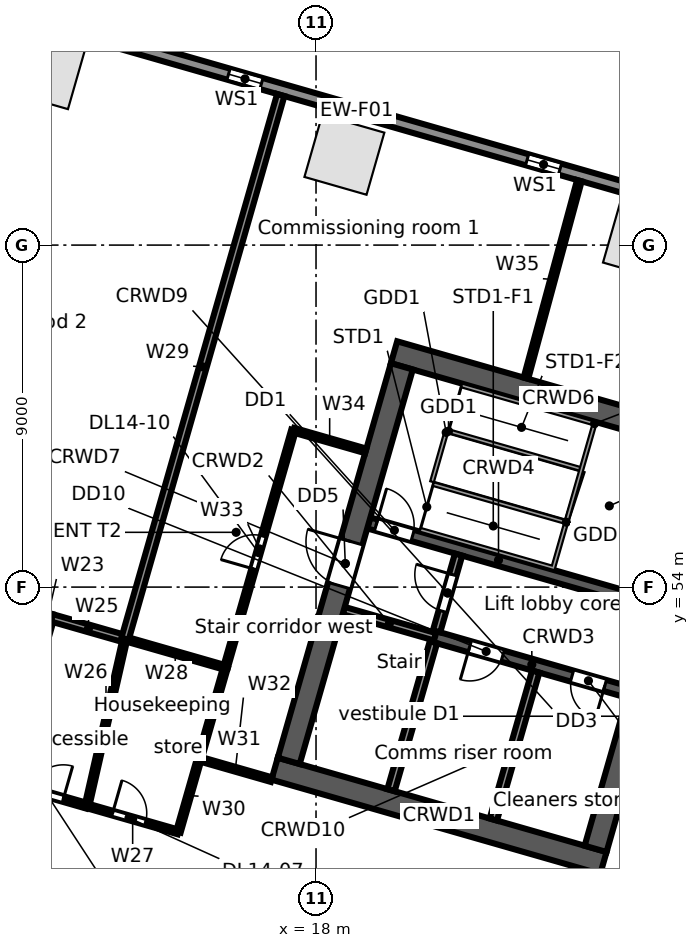
"""IFC4 building model, lengths in metres.
Left out: names, types, materials, properties, quantities, classifications, styles, units other than length and angle.
Written with IfcOpenShell. Run it as: python <this file> out.ifc"""

import sys

from ifc_helpers import new_model, si_unit, direction, frame, frame_2d, origin, origin_2d, place, context, subcontext, project, spatial, rectangle, extrude, element, fill, save


model = new_model("IFC4")
c1 = context("Model", 3, precision=1e-05, world=origin(), true_north=direction((0.0, 1.0)))
c2 = subcontext(c1, "Body", "Model", "MODEL_VIEW")
j1 = project(units=[si_unit("LENGTHUNIT", "METRE"), si_unit("PLANEANGLEUNIT", "RADIAN")], contexts=[c1])
p1 = place(None, origin())
s1 = spatial("IfcSite", under=j1, at=p1, CompositionType="ELEMENT")
p2 = place(p1, origin())
s2 = spatial("IfcBuilding", under=s1, at=p2, CompositionType="ELEMENT")
p3 = place(p2, frame((0.0, 0.0, 71.5)))
s3 = spatial("IfcBuildingStorey", under=s2, at=p3, CompositionType="ELEMENT", Elevation=71.5)
for number, where, z_axis, x_axis in (
    (1, (26.603, 63.124, 0.0), (0.0, 0.0, 1.0), (-0.961, 0.276, 0.0)),
    (2, (18.746, 65.376, 0.0), (0.0, 0.0, 1.0), (-0.961, 0.276, 0.0)),
    (3, (10.89, 67.629, 0.0), (0.0, 0.0, 1.0), (-0.961, 0.276, 0.0)),
):
    element("IfcColumn", number, at=place(p3, frame(where, z_axis=z_axis, x_axis=x_axis)), inside=s3, PredefinedType="COLUMN", context=c2, shape_type="SweptSolid", body=[
        extrude(rectangle(XDim=1.7, YDim=1.7, at=origin_2d()), origin(), (0.0, 0.0, 1.0), 5.0),
    ])
p4 = place(p3, frame((3.335, 71.044, 0.0), z_axis=(0.0, 0.0, 1.0), x_axis=(0.961260130989, -0.275642813387, 0.0)))
e4 = element("IfcWall", 4, at=p4, inside=s3, PredefinedType="STANDARD", context=c2, shape_type="SweptSolid", body=[
    extrude(rectangle(XDim=32.741, YDim=0.3, at=frame_2d((16.371, 0.0))), origin(), (0.0, 0.0, 1.0), 4.68),
])
p5 = place(p4, frame((29.207, 0.0, 0.6)))
e5 = element("IfcOpeningElement", 5, at=p5, cuts=e4, PredefinedType="OPENING", context=c2, shape_type="SweptSolid", body=[
    extrude(rectangle(XDim=0.9, YDim=3.2, at=frame_2d((0.45, 1.6))), frame((0.0, 0.16, 0.0), z_axis=(0.0, -1.0, 0.0), x_axis=(1.0, 0.0, 0.0)), (0.0, 0.0, 1.0), 0.32),
])
p6 = place(p4, frame((21.034, 0.0, 0.6)))
e6 = element("IfcOpeningElement", 6, at=p6, cuts=e4, PredefinedType="OPENING", context=c2, shape_type="SweptSolid", body=[
    extrude(rectangle(XDim=0.9, YDim=3.2, at=frame_2d((0.45, 1.6))), frame((0.0, 0.16, 0.0), z_axis=(0.0, -1.0, 0.0), x_axis=(1.0, 0.0, 0.0)), (0.0, 0.0, 1.0), 0.32),
])
p7 = place(p4, frame((12.861, 0.0, 0.6)))
e7 = element("IfcOpeningElement", 7, at=p7, cuts=e4, PredefinedType="OPENING", context=c2, shape_type="SweptSolid", body=[
    extrude(rectangle(XDim=0.9, YDim=3.2, at=frame_2d((0.45, 1.6))), frame((0.0, 0.16, 0.0), z_axis=(0.0, -1.0, 0.0), x_axis=(1.0, 0.0, 0.0)), (0.0, 0.0, 1.0), 0.32),
])
p8 = place(p4, frame((4.688, 0.0, 0.6)))
e8 = element("IfcOpeningElement", 8, at=p8, cuts=e4, PredefinedType="OPENING", context=c2, shape_type="SweptSolid", body=[
    extrude(rectangle(XDim=0.9, YDim=3.2, at=frame_2d((0.45, 1.6))), frame((0.0, 0.16, 0.0), z_axis=(0.0, -1.0, 0.0), x_axis=(1.0, 0.0, 0.0)), (0.0, 0.0, 1.0), 0.32),
])
p9 = place(p3, frame((25.398, 40.717, 0.0), z_axis=(0.0, 0.0, 1.0), x_axis=(-0.961262423262, 0.275634819324, 0.0)))
e9 = element("IfcWall", 9, at=p9, inside=s3, PredefinedType="STANDARD", context=c2, shape_type="SweptSolid", body=[
    extrude(rectangle(XDim=26.359, YDim=0.3, at=frame_2d((13.179, 0.0))), origin(), (0.0, 0.0, 1.0), 4.68),
])
p10 = place(p9, frame((22.664, 0.0, 0.6)))
e10 = element("IfcOpeningElement", 10, at=p10, cuts=e9, PredefinedType="OPENING", context=c2, shape_type="SweptSolid", body=[
    extrude(rectangle(XDim=0.9, YDim=3.2, at=frame_2d((0.45, 1.6))), frame((0.0, 0.16, 0.0), z_axis=(0.0, -1.0, 0.0), x_axis=(1.0, 0.0, 0.0)), (0.0, 0.0, 1.0), 0.32),
])
p11 = place(p9, frame((13.844, 0.0, 0.6)))
e11 = element("IfcOpeningElement", 11, at=p11, cuts=e9, PredefinedType="OPENING", context=c2, shape_type="SweptSolid", body=[
    extrude(rectangle(XDim=0.9, YDim=3.2, at=frame_2d((0.45, 1.6))), frame((0.0, 0.16, 0.0), z_axis=(0.0, -1.0, 0.0), x_axis=(1.0, 0.0, 0.0)), (0.0, 0.0, 1.0), 0.32),
])
p12 = place(p9, frame((5.023, 0.0, 0.6)))
e12 = element("IfcOpeningElement", 12, at=p12, cuts=e9, PredefinedType="OPENING", context=c2, shape_type="SweptSolid", body=[
    extrude(rectangle(XDim=0.9, YDim=3.2, at=frame_2d((0.45, 1.6))), frame((0.0, 0.16, 0.0), z_axis=(0.0, -1.0, 0.0), x_axis=(1.0, 0.0, 0.0)), (0.0, 0.0, 1.0), 0.32),
])
p13 = place(p3, frame((16.911, 49.221, 0.0), z_axis=(0.0, 0.0, 1.0), x_axis=(0.96126248289, -0.275634611374, 0.0)))
e13 = element("IfcWall", 13, at=p13, inside=s3, PredefinedType="SOLIDWALL", context=c2, shape_type="SweptSolid", body=[
    extrude(rectangle(XDim=9.0, YDim=0.6, at=frame_2d((4.5, 0.0))), origin(), (0.0, 0.0, 1.0), 4.68),
])
p14 = place(p3, frame((18.728, 53.382, 0.0), z_axis=(0.0, 0.0, 1.0), x_axis=(0.961247070632, -0.275688355216, 0.0)))
e14 = element("IfcWall", 14, at=p14, inside=s3, PredefinedType="SOLIDWALL", context=c2, shape_type="SweptSolid", body=[
    extrude(rectangle(XDim=2.5, YDim=0.2, at=frame_2d((1.25, 0.0))), origin(), (0.0, 0.0, 1.0), 4.68),
])
p15 = place(p3, frame((21.131, 52.692, 0.0), z_axis=(0.0, 0.0, 1.0), x_axis=(0.961271492568, -0.275603188616, 0.0)))
e15 = element("IfcWall", 15, at=p15, inside=s3, PredefinedType="SOLIDWALL", context=c2, shape_type="SweptSolid", body=[
    extrude(rectangle(XDim=5.3, YDim=0.3, at=frame_2d((2.65, 0.0))), origin(), (0.0, 0.0, 1.0), 4.68),
])
p16 = place(p15, frame((0.95, 0.0, 0.0)))
e16 = element("IfcOpeningElement", 16, at=p16, cuts=e15, PredefinedType="OPENING", context=c2, shape_type="SweptSolid", body=[
    extrude(rectangle(XDim=0.9, YDim=2.1, at=frame_2d((0.45, 1.05))), frame((0.0, 0.16, 0.0), z_axis=(0.0, -1.0, 0.0), x_axis=(1.0, 0.0, 0.0)), (0.0, 0.0, 1.0), 0.32),
])
p17 = place(p15, frame((3.75, 0.0, 0.0)))
e17 = element("IfcOpeningElement", 17, at=p17, cuts=e15, PredefinedType="OPENING", context=c2, shape_type="SweptSolid", body=[
    extrude(rectangle(XDim=0.9, YDim=2.1, at=frame_2d((0.45, 1.05))), frame((0.0, 0.16, 0.0), z_axis=(0.0, -1.0, 0.0), x_axis=(1.0, 0.0, 0.0)), (0.0, 0.0, 1.0), 0.32),
])
p18 = place(p3, frame((19.389, 55.689, 0.0), z_axis=(0.0, 0.0, 1.0), x_axis=(0.961261397636, -0.275638396117, 0.0)))
e18 = element("IfcWall", 18, at=p18, inside=s3, PredefinedType="SOLIDWALL", context=c2, shape_type="SweptSolid", body=[
    extrude(rectangle(XDim=7.1, YDim=0.3, at=frame_2d((3.55, 0.0))), origin(), (0.0, 0.0, 1.0), 4.68),
])
p19 = place(p18, frame((0.2, 0.0, 0.0)))
e19 = element("IfcOpeningElement", 19, at=p19, cuts=e18, PredefinedType="OPENING", context=c2, shape_type="SweptSolid", body=[
    extrude(rectangle(XDim=1.0, YDim=2.1, at=frame_2d((0.5, 1.05))), frame((0.0, 0.16, 0.0), z_axis=(0.0, -1.0, 0.0), x_axis=(1.0, 0.0, 0.0)), (0.0, 0.0, 1.0), 0.32),
])
p20 = place(p3, frame((20.053, 60.18, 0.0), z_axis=(0.0, 0.0, 1.0), x_axis=(0.96126248289, -0.275634611374, 0.0)))
e20 = element("IfcWall", 20, at=p20, inside=s3, PredefinedType="SOLIDWALL", context=c2, shape_type="SweptSolid", body=[
    extrude(rectangle(XDim=9.0, YDim=0.6, at=frame_2d((4.5, 0.0))), origin(), (0.0, 0.0, 1.0), 4.68),
])
p21 = place(p3, frame((17.282, 49.427, 0.0), z_axis=(0.0, 0.0, 1.0), x_axis=(0.275631631629, 0.961263337304, 0.0)))
e21 = element("IfcWall", 21, at=p21, inside=s3, PredefinedType="SOLIDWALL", context=c2, shape_type="SweptSolid", body=[
    extrude(rectangle(XDim=10.8, YDim=0.6, at=frame_2d((5.4, 0.0))), origin(), (0.0, 0.0, 1.0), 4.68),
])
p22 = place(p21, frame((4.8, 0.0, 0.0)))
e22 = element("IfcOpeningElement", 22, at=p22, cuts=e21, PredefinedType="OPENING", context=c2, shape_type="SweptSolid", body=[
    extrude(rectangle(XDim=1.2, YDim=2.1, at=frame_2d((0.6, 1.05))), frame((0.0, 0.31, 0.0), z_axis=(0.0, -1.0, 0.0), x_axis=(1.0, 0.0, 0.0)), (0.0, 0.0, 1.0), 0.62),
])
p23 = place(p3, frame((19.973, 48.655, 0.0), z_axis=(0.0, 0.0, 1.0), x_axis=(0.275668441653, 0.961252781674, 0.0)))
e23 = element("IfcWall", 23, at=p23, inside=s3, PredefinedType="SOLIDWALL", context=c2, shape_type="SweptSolid", body=[
    extrude(rectangle(XDim=4.05, YDim=0.2, at=frame_2d((2.025, 0.0))), origin(), (0.0, 0.0, 1.0), 4.68),
])
p24 = place(p3, frame((21.172, 52.837, 0.0), z_axis=(0.0, 0.0, 1.0), x_axis=(0.275657676022, 0.961255868981, 0.0)))
e24 = element("IfcWall", 24, at=p24, inside=s3, PredefinedType="PARTITIONING", context=c2, shape_type="SweptSolid", body=[
    extrude(rectangle(XDim=2.1, YDim=0.2, at=frame_2d((1.05, 0.0))), origin(), (0.0, 0.0, 1.0), 4.68),
])
p25 = place(p24, frame((0.55, 0.0, 0.0)))
e25 = element("IfcOpeningElement", 25, at=p25, cuts=e24, PredefinedType="OPENING", context=c2, shape_type="SweptSolid", body=[
    extrude(rectangle(XDim=1.0, YDim=2.1, at=frame_2d((0.5, 1.05))), frame((0.0, 0.11, 0.0), z_axis=(0.0, -1.0, 0.0), x_axis=(1.0, 0.0, 0.0)), (0.0, 0.0, 1.0), 0.22),
])
p26 = place(p3, frame((22.665, 47.883, 0.0), z_axis=(0.0, 0.0, 1.0), x_axis=(0.275596769212, 0.961273333033, 0.0)))
e26 = element("IfcWall", 26, at=p26, inside=s3, PredefinedType="PARTITIONING", context=c2, shape_type="SweptSolid", body=[
    extrude(rectangle(XDim=4.05, YDim=0.2, at=frame_2d((2.025, 0.0))), origin(), (0.0, 0.0, 1.0), 4.68),
])
p27 = place(p3, frame((25.356, 47.112, 0.0), z_axis=(0.0, 0.0, 1.0), x_axis=(0.275631631629, 0.961263337304, 0.0)))
e27 = element("IfcWall", 27, at=p27, inside=s3, PredefinedType="SOLIDWALL", context=c2, shape_type="SweptSolid", body=[
    extrude(rectangle(XDim=10.8, YDim=0.6, at=frame_2d((5.4, 0.0))), origin(), (0.0, 0.0, 1.0), 4.68),
])
p28 = place(p27, frame((4.8, 0.0, 0.0)))
e28 = element("IfcOpeningElement", 28, at=p28, cuts=e27, PredefinedType="OPENING", context=c2, shape_type="SweptSolid", body=[
    extrude(rectangle(XDim=1.2, YDim=2.1, at=frame_2d((0.6, 1.05))), frame((0.0, 0.31, 0.0), z_axis=(0.0, -1.0, 0.0), x_axis=(1.0, 0.0, 0.0)), (0.0, 0.0, 1.0), 0.62),
])
p29 = place(p3, frame((8.167, 54.017, 0.0), z_axis=(0.0, 0.0, 1.0), x_axis=(0.961247103494, -0.275688240636, 0.0)))
e29 = element("IfcWall", 29, at=p29, inside=s3, PredefinedType="PARTITIONING", context=c2, shape_type="SweptSolid", body=[
    extrude(rectangle(XDim=3.0, YDim=0.2, at=frame_2d((1.5, 0.0))), origin(), (0.0, 0.0, 1.0), 3.742),
])
p30 = place(p3, frame((9.811, 48.864, 0.0), z_axis=(0.0, 0.0, 1.0), x_axis=(0.275545040649, 0.96128816209, 0.0)))
e30 = element("IfcWall", 30, at=p30, inside=s3, PredefinedType="PARTITIONING", context=c2, shape_type="SweptSolid", body=[
    extrude(rectangle(XDim=4.5, YDim=0.125, at=frame_2d((2.25, 0.0))), origin(), (0.0, 0.0, 1.0), 4.68),
])
p31 = place(p3, frame((9.811, 48.864, 0.0), z_axis=(0.0, 0.0, 1.0), x_axis=(0.961236680145, -0.275724581318, 0.0)))
e31 = element("IfcWall", 31, at=p31, inside=s3, PredefinedType="PARTITIONING", context=c2, shape_type="SweptSolid", body=[
    extrude(rectangle(XDim=2.249, YDim=0.15, at=frame_2d((1.125, 0.0))), origin(), (0.0, 0.0, 1.0), 4.68),
])
p32 = place(p31, frame((0.7, 0.0, 0.0)))
e32 = element("IfcOpeningElement", 32, at=p32, cuts=e31, PredefinedType="OPENING", context=c2, shape_type="SweptSolid", body=[
    extrude(rectangle(XDim=0.9, YDim=2.1, at=frame_2d((0.45, 1.05))), frame((0.0, 0.085, 0.0), z_axis=(0.0, -1.0, 0.0), x_axis=(1.0, 0.0, 0.0)), (0.0, 0.0, 1.0), 0.17),
])
p33 = place(p3, frame((11.051, 53.19, 0.0), z_axis=(0.0, 0.0, 1.0), x_axis=(0.961316434736, -0.275446387355, 0.0)))
e33 = element("IfcWall", 33, at=p33, inside=s3, PredefinedType="PARTITIONING", context=c2, shape_type="SweptSolid", body=[
    extrude(rectangle(XDim=2.0, YDim=0.2, at=frame_2d((1.0, 0.0))), origin(), (0.0, 0.0, 1.0), 4.68),
])
p34 = place(p3, frame((11.973, 48.244, 0.0), z_axis=(0.0, 0.0, 1.0), x_axis=(0.222117362571, 0.975019936845, 0.0)))
e34 = element("IfcWall", 34, at=p34, inside=s3, PredefinedType="PARTITIONING", context=c2, shape_type="SweptSolid", body=[
    extrude(rectangle(XDim=4.508, YDim=0.125, at=frame_2d((2.254, 0.0))), origin(), (0.0, 0.0, 1.0), 4.68),
])
p35 = place(p3, frame((11.973, 48.244, 0.0), z_axis=(0.0, 0.0, 1.0), x_axis=(0.961302601161, -0.275494662382, 0.0)))
e35 = element("IfcWall", 35, at=p35, inside=s3, PredefinedType="PARTITIONING", context=c2, shape_type="SweptSolid", body=[
    extrude(rectangle(XDim=2.501, YDim=0.125, at=frame_2d((1.25, 0.0))), origin(), (0.0, 0.0, 1.0), 4.68),
])
p36 = place(p35, frame((0.7, 0.0, 0.0)))
e36 = element("IfcOpeningElement", 36, at=p36, cuts=e35, PredefinedType="OPENING", context=c2, shape_type="SweptSolid", body=[
    extrude(rectangle(XDim=0.9, YDim=2.1, at=frame_2d((0.45, 1.05))), frame((0.0, 0.073, 0.0), z_axis=(0.0, -1.0, 0.0), x_axis=(1.0, 0.0, 0.0)), (0.0, 0.0, 1.0), 0.145),
])
p37 = place(p3, frame((12.974, 52.639, 0.0), z_axis=(0.0, 0.0, 1.0), x_axis=(0.961262138292, -0.275635813142, 0.0)))
e37 = element("IfcWall", 37, at=p37, inside=s3, PredefinedType="PARTITIONING", context=c2, shape_type="SweptSolid", body=[
    extrude(rectangle(XDim=2.749, YDim=0.125, at=frame_2d((1.375, 0.0))), origin(), (0.0, 0.0, 1.0), 4.68),
])
p38 = place(p3, frame((12.974, 52.639, 0.0), z_axis=(0.0, 0.0, 1.0), x_axis=(0.275299463768, 0.961358520662, 0.0)))
e38 = element("IfcWall", 38, at=p38, inside=s3, PredefinedType="PARTITIONING", context=c2, shape_type="SweptSolid", body=[
    extrude(rectangle(XDim=14.885, YDim=0.2, at=frame_2d((7.443, 0.0))), origin(), (0.0, 0.0, 1.0), 3.742),
])
p39 = place(p3, frame((14.377, 47.555, 0.0), z_axis=(0.0, 0.0, 1.0), x_axis=(0.275446387355, 0.961316434736, 0.0)))
e39 = element("IfcWall", 39, at=p39, inside=s3, PredefinedType="PARTITIONING", context=c2, shape_type="SweptSolid", body=[
    extrude(rectangle(XDim=2.0, YDim=0.125, at=frame_2d((1.0, 0.0))), origin(), (0.0, 0.0, 1.0), 4.68),
])
p40 = place(p3, frame((14.928, 49.478, 0.0), z_axis=(0.0, 0.0, 1.0), x_axis=(0.275598116036, 0.961272946898, 0.0)))
e40 = element("IfcWall", 40, at=p40, inside=s3, PredefinedType="PARTITIONING", context=c2, shape_type="SweptSolid", body=[
    extrude(rectangle(XDim=2.5, YDim=0.125, at=frame_2d((1.25, 0.0))), origin(), (0.0, 0.0, 1.0), 4.68),
])
p41 = place(p3, frame((14.928, 49.478, 0.0), z_axis=(0.0, 0.0, 1.0), x_axis=(0.961243778232, -0.27569983462, 0.0)))
e41 = element("IfcWall", 41, at=p41, inside=s3, PredefinedType="PARTITIONING", context=c2, shape_type="SweptSolid", body=[
    extrude(rectangle(XDim=1.977, YDim=0.125, at=frame_2d((0.988, 0.0))), origin(), (0.0, 0.0, 1.0), 4.68),
])
p42 = place(p3, frame((15.617, 51.881, 0.0), z_axis=(0.0, 0.0, 1.0), x_axis=(0.275703259795, 0.961242795832, 0.0)))
e42 = element("IfcWall", 42, at=p42, inside=s3, PredefinedType="PARTITIONING", context=c2, shape_type="SweptSolid", body=[
    extrude(rectangle(XDim=6.5, YDim=0.125, at=frame_2d((3.25, 0.0))), origin(), (0.0, 0.0, 1.0), 3.742),
])
p43 = place(p42, frame((2.7, 0.0, 0.0)))
e43 = element("IfcOpeningElement", 43, at=p43, cuts=e42, PredefinedType="OPENING", context=c2, shape_type="SweptSolid", body=[
    extrude(rectangle(XDim=0.9, YDim=2.1, at=frame_2d((0.45, 1.05))), frame((0.0, 0.073, 0.0), z_axis=(0.0, -1.0, 0.0), x_axis=(1.0, 0.0, 0.0)), (0.0, 0.0, 1.0), 0.145),
])
p44 = place(p3, frame((17.409, 58.129, 0.0), z_axis=(0.0, 0.0, 1.0), x_axis=(0.961253165474, -0.275667103345, 0.0)))
e44 = element("IfcWall", 44, at=p44, inside=s3, PredefinedType="PARTITIONING", context=c2, shape_type="SweptSolid", body=[
    extrude(rectangle(XDim=1.977, YDim=0.125, at=frame_2d((0.988, 0.0))), origin(), (0.0, 0.0, 1.0), 4.68),
])
p45 = place(p3, frame((23.523, 59.497, 0.0), z_axis=(0.0, 0.0, 1.0), x_axis=(0.261275557939, 0.965264255437, 0.0)))
e45 = element("IfcWall", 45, at=p45, inside=s3, PredefinedType="PARTITIONING", context=c2, shape_type="SweptSolid", body=[
    extrude(rectangle(XDim=5.385, YDim=0.125, at=frame_2d((2.692, 0.0))), origin(), (0.0, 0.0, 1.0), 3.96),
])
p46 = place(p6, origin())
e46 = element("IfcWindow", 46, at=p46, inside=s3, PartitioningType="SINGLE_PANEL", PredefinedType="WINDOW", context=c2, shape_type="SweptSolid", body=[
    extrude(rectangle(XDim=0.9, YDim=3.2, at=frame_2d((0.45, 1.6))), frame((0.0, 0.03, 0.0), z_axis=(0.0, -1.0, 0.0), x_axis=(1.0, 0.0, 0.0)), (0.0, 0.0, 1.0), 0.06),
])
fill(e6, e46)
p47 = place(p7, origin())
e47 = element("IfcWindow", 47, at=p47, inside=s3, PartitioningType="SINGLE_PANEL", PredefinedType="WINDOW", context=c2, shape_type="SweptSolid", body=[
    extrude(rectangle(XDim=0.9, YDim=3.2, at=frame_2d((0.45, 1.6))), frame((0.0, 0.03, 0.0), z_axis=(0.0, -1.0, 0.0), x_axis=(1.0, 0.0, 0.0)), (0.0, 0.0, 1.0), 0.06),
])
fill(e7, e47)
p48 = place(p19, origin())
e48 = element("IfcDoor", 48, at=p48, inside=s3, OperationType="SINGLE_SWING_LEFT", PredefinedType="DOOR", context=c2, shape_type="SweptSolid", body=[
    extrude(rectangle(XDim=1.0, YDim=2.1, at=frame_2d((0.5, 1.05))), frame((0.0, 0.025, 0.0), z_axis=(0.0, -1.0, 0.0), x_axis=(1.0, 0.0, 0.0)), (0.0, 0.0, 1.0), 0.05),
])
fill(e19, e48)
p49 = place(p25, origin())
e49 = element("IfcDoor", 49, at=p49, inside=s3, OperationType="SINGLE_SWING_RIGHT", PredefinedType="DOOR", context=c2, shape_type="SweptSolid", body=[
    extrude(rectangle(XDim=1.0, YDim=2.1, at=frame_2d((0.5, 1.05))), frame((0.0, 0.025, 0.0), z_axis=(0.0, -1.0, 0.0), x_axis=(1.0, 0.0, 0.0)), (0.0, 0.0, 1.0), 0.05),
])
fill(e25, e49)
p50 = place(p22, origin())
e50 = element("IfcDoor", 50, at=p50, inside=s3, OperationType="SINGLE_SWING_RIGHT", PredefinedType="DOOR", context=c2, shape_type="SweptSolid", body=[
    extrude(rectangle(XDim=1.2, YDim=2.1, at=frame_2d((0.6, 1.05))), frame((0.0, 0.025, 0.0), z_axis=(0.0, -1.0, 0.0), x_axis=(1.0, 0.0, 0.0)), (0.0, 0.0, 1.0), 0.05),
])
fill(e22, e50)
p51 = place(p16, frame((0.9, 0.0, 0.0), z_axis=(0.0, 0.0, 1.0), x_axis=(-1.0, 0.0, 0.0)))
e51 = element("IfcDoor", 51, at=p51, inside=s3, OperationType="SINGLE_SWING_RIGHT", PredefinedType="DOOR", context=c2, shape_type="SweptSolid", body=[
    extrude(rectangle(XDim=0.9, YDim=2.1, at=frame_2d((0.45, 1.05))), frame((0.0, 0.025, 0.0), z_axis=(0.0, -1.0, 0.0), x_axis=(1.0, 0.0, 0.0)), (0.0, 0.0, 1.0), 0.05),
])
fill(e16, e51)
p52 = place(p17, frame((0.9, 0.0, 0.0), z_axis=(0.0, 0.0, 1.0), x_axis=(-1.0, 0.0, 0.0)))
e52 = element("IfcDoor", 52, at=p52, inside=s3, OperationType="SINGLE_SWING_LEFT", PredefinedType="DOOR", context=c2, shape_type="SweptSolid", body=[
    extrude(rectangle(XDim=0.9, YDim=2.1, at=frame_2d((0.45, 1.05))), frame((0.0, 0.025, 0.0), z_axis=(0.0, -1.0, 0.0), x_axis=(1.0, 0.0, 0.0)), (0.0, 0.0, 1.0), 0.05),
])
fill(e17, e52)
p53 = place(p32, origin())
e53 = element("IfcDoor", 53, at=p53, inside=s3, OperationType="SINGLE_SWING_RIGHT", PredefinedType="DOOR", context=c2, shape_type="SweptSolid", body=[
    extrude(rectangle(XDim=0.9, YDim=2.1, at=frame_2d((0.45, 1.05))), frame((0.0, 0.025, 0.0), z_axis=(0.0, -1.0, 0.0), x_axis=(1.0, 0.0, 0.0)), (0.0, 0.0, 1.0), 0.05),
])
fill(e32, e53)
p54 = place(p36, origin())
e54 = element("IfcDoor", 54, at=p54, inside=s3, OperationType="SINGLE_SWING_LEFT", PredefinedType="DOOR", context=c2, shape_type="SweptSolid", body=[
    extrude(rectangle(XDim=0.9, YDim=2.1, at=frame_2d((0.45, 1.05))), frame((0.0, 0.025, 0.0), z_axis=(0.0, -1.0, 0.0), x_axis=(1.0, 0.0, 0.0)), (0.0, 0.0, 1.0), 0.05),
])
fill(e36, e54)
p55 = place(p43, origin())
e55 = element("IfcDoor", 55, at=p55, inside=s3, OperationType="SINGLE_SWING_LEFT", PredefinedType="DOOR", context=c2, shape_type="SweptSolid", body=[
    extrude(rectangle(XDim=0.9, YDim=2.1, at=frame_2d((0.45, 1.05))), frame((0.0, 0.025, 0.0), z_axis=(0.0, -1.0, 0.0), x_axis=(1.0, 0.0, 0.0)), (0.0, 0.0, 1.0), 0.05),
])
fill(e43, e55)
save(model, sys.argv[1])
